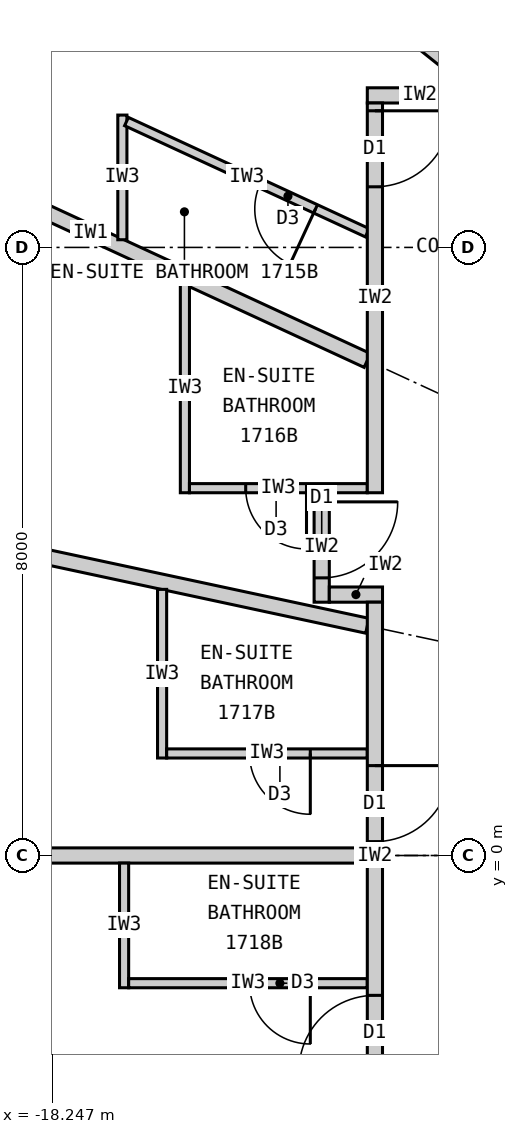
"""IFC4 building model, lengths in metres.
Left out: names, types, materials, properties, quantities, classifications, styles, units other than length and angle.
Written with IfcOpenShell. Run it as: python <this file> out.ifc"""

import sys

from ifc_helpers import new_model, si_unit, direction, frame, frame_2d, origin, place, context, subcontext, project, spatial, rectangle, extrude, element, fill, save


model = new_model("IFC4")
c1 = context("Model", 3, precision=1e-05, world=origin(), true_north=direction((0.0, 1.0)))
c2 = subcontext(c1, "Body", "Model", "MODEL_VIEW")
j1 = project(units=[si_unit("LENGTHUNIT", "METRE"), si_unit("PLANEANGLEUNIT", "RADIAN")], contexts=[c1])
p1 = place(None, origin())
s1 = spatial("IfcSite", under=j1, at=p1, CompositionType="ELEMENT")
p2 = place(p1, origin())
s2 = spatial("IfcBuilding", under=s1, at=p2, CompositionType="ELEMENT")
p3 = place(p2, frame((0.0, 0.0, 70.5)))
s3 = spatial("IfcBuildingStorey", under=s2, at=p3, CompositionType="ELEMENT", Elevation=70.5)
p4 = place(p3, frame((-12.625, 10.1, 0.0), z_axis=(0.0, 0.0, 1.0), x_axis=(-0.780892451574, 0.624665493744, 0.0)))
e1 = element("IfcWall", 1, at=p4, inside=s3, PredefinedType="PARTITIONING", context=c2, shape_type="SweptSolid", body=[
    extrude(rectangle(XDim=6.045, YDim=0.2, at=frame_2d((3.022, 0.0))), origin(), (0.0, 0.0, 1.0), 2.32),
])
p5 = place(p3, frame((-14.1, 6.512, 0.0), z_axis=(0.0, 0.0, 1.0), x_axis=(-0.907832871056, 0.419332181247, 0.0)))
e2 = element("IfcWall", 2, at=p5, inside=s3, PredefinedType="PARTITIONING", context=c2, shape_type="SweptSolid", body=[
    extrude(rectangle(XDim=8.023, YDim=0.2, at=frame_2d((4.011, 0.0))), origin(), (0.0, 0.0, 1.0), 2.32),
])
p6 = place(p3, frame((-14.1, 3.022, 0.0), z_axis=(0.0, 0.0, 1.0), x_axis=(-0.977790014929, 0.209586943072, 0.0)))
e3 = element("IfcWall", 3, at=p6, inside=s3, PredefinedType="PARTITIONING", context=c2, shape_type="SweptSolid", body=[
    extrude(rectangle(XDim=10.087, YDim=0.2, at=frame_2d((5.043, 0.0))), origin(), (0.0, 0.0, 1.0), 2.32),
])
p7 = place(p3, frame((-14.1, 0.0, 0.0), z_axis=(0.0, 0.0, 1.0), x_axis=(-1.0, 0.0, 0.0)))
e4 = element("IfcWall", 4, at=p7, inside=s3, PredefinedType="PARTITIONING", context=c2, shape_type="SweptSolid", body=[
    extrude(rectangle(XDim=10.75, YDim=0.2, at=frame_2d((5.375, 0.0))), origin(), (0.0, 0.0, 1.0), 2.27),
])
p8 = place(p3, frame((-17.323, 8.101, 0.0), z_axis=(0.0, 0.0, 1.0), x_axis=(0.0, 1.0, 0.0)))
e5 = element("IfcWall", 5, at=p8, inside=s3, PredefinedType="PARTITIONING", context=c2, shape_type="SweptSolid", body=[
    extrude(rectangle(XDim=1.64, YDim=0.12, at=frame_2d((0.82, 0.0))), origin(), (0.0, 0.0, 1.0), 3.12),
])
p9 = place(p3, frame((-14.1, 8.193, 0.0), z_axis=(0.0, 0.0, 1.0), x_axis=(-0.907836493557, 0.419324338628, 0.0)))
e6 = element("IfcWall", 6, at=p9, inside=s3, PredefinedType="PARTITIONING", context=c2, shape_type="SweptSolid", body=[
    extrude(rectangle(XDim=3.49, YDim=0.12, at=frame_2d((1.745, 0.0))), origin(), (0.0, 0.0, 1.0), 3.12),
])
p10 = place(p9, frame((0.75, 0.0, 0.0)))
e7 = element("IfcOpeningElement", 7, at=p10, cuts=e6, PredefinedType="OPENING", context=c2, shape_type="SweptSolid", body=[
    extrude(rectangle(XDim=0.8, YDim=2.1, at=frame_2d((0.4, 1.05))), frame((0.0, 0.07, 0.0), z_axis=(0.0, -1.0, 0.0), x_axis=(1.0, 0.0, 0.0)), (0.0, 0.0, 1.0), 0.14),
])
p11 = place(p3, frame((-16.5, 7.521, 0.0), z_axis=(0.0, 0.0, 1.0), x_axis=(0.0, -1.0, 0.0)))
e8 = element("IfcWall", 8, at=p11, inside=s3, PredefinedType="PARTITIONING", context=c2, shape_type="SweptSolid", body=[
    extrude(rectangle(XDim=2.749, YDim=0.12, at=frame_2d((1.374, 0.0))), origin(), (0.0, 0.0, 1.0), 3.12),
])
p12 = place(p3, frame((-14.1, 4.833, 0.0), z_axis=(0.0, 0.0, 1.0), x_axis=(-1.0, 0.0, 0.0)))
e9 = element("IfcWall", 9, at=p12, inside=s3, PredefinedType="PARTITIONING", context=c2, shape_type="SweptSolid", body=[
    extrude(rectangle(XDim=2.34, YDim=0.12, at=frame_2d((1.17, 0.0))), origin(), (0.0, 0.0, 1.0), 3.12),
])
p13 = place(p12, frame((0.8, 0.0, 0.0)))
e10 = element("IfcOpeningElement", 10, at=p13, cuts=e9, PredefinedType="OPENING", context=c2, shape_type="SweptSolid", body=[
    extrude(rectangle(XDim=0.8, YDim=2.1, at=frame_2d((0.4, 1.05))), frame((0.0, 0.07, 0.0), z_axis=(0.0, -1.0, 0.0), x_axis=(1.0, 0.0, 0.0)), (0.0, 0.0, 1.0), 0.14),
])
p14 = place(p3, frame((-16.8, 3.501, 0.0), z_axis=(0.0, 0.0, 1.0), x_axis=(0.0, -1.0, 0.0)))
e11 = element("IfcWall", 11, at=p14, inside=s3, PredefinedType="PARTITIONING", context=c2, shape_type="SweptSolid", body=[
    extrude(rectangle(XDim=2.219, YDim=0.12, at=frame_2d((1.109, 0.0))), origin(), (0.0, 0.0, 1.0), 3.12),
])
p15 = place(p3, frame((-14.1, 1.343, 0.0), z_axis=(0.0, 0.0, 1.0), x_axis=(-1.0, 0.0, 0.0)))
e12 = element("IfcWall", 12, at=p15, inside=s3, PredefinedType="PARTITIONING", context=c2, shape_type="SweptSolid", body=[
    extrude(rectangle(XDim=2.64, YDim=0.12, at=frame_2d((1.32, 0.0))), origin(), (0.0, 0.0, 1.0), 3.12),
])
p16 = place(p15, frame((0.75, 0.0, 0.0)))
e13 = element("IfcOpeningElement", 13, at=p16, cuts=e12, PredefinedType="OPENING", context=c2, shape_type="SweptSolid", body=[
    extrude(rectangle(XDim=0.8, YDim=2.1, at=frame_2d((0.4, 1.05))), frame((0.0, 0.07, 0.0), z_axis=(0.0, -1.0, 0.0), x_axis=(1.0, 0.0, 0.0)), (0.0, 0.0, 1.0), 0.14),
])
p17 = place(p3, frame((-17.3, -0.1, 0.0), z_axis=(0.0, 0.0, 1.0), x_axis=(0.0, -1.0, 0.0)))
e14 = element("IfcWall", 14, at=p17, inside=s3, PredefinedType="PARTITIONING", context=c2, shape_type="SweptSolid", body=[
    extrude(rectangle(XDim=1.64, YDim=0.12, at=frame_2d((0.82, 0.0))), origin(), (0.0, 0.0, 1.0), 3.12),
])
p18 = place(p3, frame((-14.1, -1.68, 0.0), z_axis=(0.0, 0.0, 1.0), x_axis=(-1.0, 0.0, 0.0)))
e15 = element("IfcWall", 15, at=p18, inside=s3, PredefinedType="PARTITIONING", context=c2, shape_type="SweptSolid", body=[
    extrude(rectangle(XDim=3.14, YDim=0.12, at=frame_2d((1.57, 0.0))), origin(), (0.0, 0.0, 1.0), 3.12),
])
p19 = place(p18, frame((0.75, 0.0, 0.0)))
e16 = element("IfcOpeningElement", 16, at=p19, cuts=e15, PredefinedType="OPENING", context=c2, shape_type="SweptSolid", body=[
    extrude(rectangle(XDim=0.8, YDim=2.1, at=frame_2d((0.4, 1.05))), frame((0.0, 0.07, 0.0), z_axis=(0.0, -1.0, 0.0), x_axis=(1.0, 0.0, 0.0)), (0.0, 0.0, 1.0), 0.14),
])
p20 = place(p3, frame((-14.7, 4.772, 0.0), z_axis=(0.0, 0.0, 1.0), x_axis=(0.0, -1.0, 0.0)))
e17 = element("IfcWall", 17, at=p20, inside=s3, PredefinedType="PARTITIONING", context=c2, shape_type="SweptSolid", body=[
    extrude(rectangle(XDim=1.44, YDim=0.2, at=frame_2d((0.72, 0.0))), origin(), (0.0, 0.0, 1.0), 3.12),
])
p21 = place(p20, frame((0.12, 0.0, 0.0)))
e18 = element("IfcOpeningElement", 18, at=p21, cuts=e17, PredefinedType="OPENING", context=c2, shape_type="SweptSolid", body=[
    extrude(rectangle(XDim=1.0, YDim=2.2, at=frame_2d((0.5, 1.1))), frame((0.0, 0.11, 0.0), z_axis=(0.0, -1.0, 0.0), x_axis=(1.0, 0.0, 0.0)), (0.0, 0.0, 1.0), 0.22),
])
p22 = place(p3, frame((-13.9, 3.433, 0.0), z_axis=(0.0, 0.0, 1.0), x_axis=(-1.0, 0.0, 0.0)))
e19 = element("IfcWall", 19, at=p22, inside=s3, PredefinedType="PARTITIONING", context=c2, shape_type="SweptSolid", body=[
    extrude(rectangle(XDim=0.7, YDim=0.2, at=frame_2d((0.35, 0.0))), origin(), (0.0, 0.0, 1.0), 2.32),
])
p23 = place(p3, frame((-14.1, 10.0, 0.0), z_axis=(0.0, 0.0, 1.0), x_axis=(1.0, 0.0, 0.0)))
e20 = element("IfcWall", 20, at=p23, inside=s3, PredefinedType="PARTITIONING", context=c2, shape_type="SweptSolid", body=[
    extrude(rectangle(XDim=2.481, YDim=0.2, at=frame_2d((1.24, 0.0))), origin(), (0.0, 0.0, 1.0), 3.12),
])
p24 = place(p3, frame((-14.0, 9.9, 0.0), z_axis=(0.0, 0.0, 1.0), x_axis=(0.0, -1.0, 0.0)))
e21 = element("IfcWall", 21, at=p24, inside=s3, PredefinedType="PARTITIONING", context=c2, shape_type="SweptSolid", body=[
    extrude(rectangle(XDim=5.127, YDim=0.2, at=frame_2d((2.564, 0.0))), origin(), (0.0, 0.0, 1.0), 3.12),
])
p25 = place(p24, frame((0.103, 0.0, 0.0)))
e22 = element("IfcOpeningElement", 22, at=p25, cuts=e21, PredefinedType="OPENING", context=c2, shape_type="SweptSolid", body=[
    extrude(rectangle(XDim=1.0, YDim=2.2, at=frame_2d((0.5, 1.1))), frame((0.0, 0.11, 0.0), z_axis=(0.0, -1.0, 0.0), x_axis=(1.0, 0.0, 0.0)), (0.0, 0.0, 1.0), 0.22),
])
p26 = place(p3, frame((-14.0, 3.333, 0.0), z_axis=(0.0, 0.0, 1.0), x_axis=(0.0, -1.0, 0.0)))
e23 = element("IfcWall", 23, at=p26, inside=s3, PredefinedType="PARTITIONING", context=c2, shape_type="SweptSolid", body=[
    extrude(rectangle(XDim=6.665, YDim=0.2, at=frame_2d((3.333, 0.0))), origin(), (0.0, 0.0, 1.0), 3.12),
])
p27 = place(p26, frame((2.15, 0.0, 0.0)))
e24 = element("IfcOpeningElement", 24, at=p27, cuts=e23, PredefinedType="OPENING", context=c2, shape_type="SweptSolid", body=[
    extrude(rectangle(XDim=1.0, YDim=2.2, at=frame_2d((0.5, 1.1))), frame((0.0, 0.11, 0.0), z_axis=(0.0, -1.0, 0.0), x_axis=(1.0, 0.0, 0.0)), (0.0, 0.0, 1.0), 0.22),
])
p28 = place(p26, frame((5.173, 0.0, 0.0)))
e25 = element("IfcOpeningElement", 25, at=p28, cuts=e23, PredefinedType="OPENING", context=c2, shape_type="SweptSolid", body=[
    extrude(rectangle(XDim=1.0, YDim=2.2, at=frame_2d((0.5, 1.1))), frame((0.0, 0.11, 0.0), z_axis=(0.0, -1.0, 0.0), x_axis=(1.0, 0.0, 0.0)), (0.0, 0.0, 1.0), 0.22),
])
p29 = place(p10, origin())
e26 = element("IfcDoor", 26, at=p29, inside=s3, OperationType="SINGLE_SWING_LEFT", PredefinedType="DOOR", context=c2, shape_type="SweptSolid", body=[
    extrude(rectangle(XDim=0.8, YDim=2.1, at=frame_2d((0.4, 1.05))), frame((0.0, 0.025, 0.0), z_axis=(0.0, -1.0, 0.0), x_axis=(1.0, 0.0, 0.0)), (0.0, 0.0, 1.0), 0.05),
])
fill(e7, e26)
p30 = place(p25, origin())
e27 = element("IfcDoor", 27, at=p30, inside=s3, OperationType="SINGLE_SWING_LEFT", PredefinedType="DOOR", context=c2, shape_type="SweptSolid", body=[
    extrude(rectangle(XDim=1.0, YDim=2.2, at=frame_2d((0.5, 1.1))), frame((0.0, 0.025, 0.0), z_axis=(0.0, -1.0, 0.0), x_axis=(1.0, 0.0, 0.0)), (0.0, 0.0, 1.0), 0.05),
])
fill(e22, e27)
p31 = place(p13, origin())
e28 = element("IfcDoor", 28, at=p31, inside=s3, OperationType="SINGLE_SWING_LEFT", PredefinedType="DOOR", context=c2, shape_type="SweptSolid", body=[
    extrude(rectangle(XDim=0.8, YDim=2.1, at=frame_2d((0.4, 1.05))), frame((0.0, 0.025, 0.0), z_axis=(0.0, -1.0, 0.0), x_axis=(1.0, 0.0, 0.0)), (0.0, 0.0, 1.0), 0.05),
])
fill(e10, e28)
p32 = place(p21, origin())
e29 = element("IfcDoor", 29, at=p32, inside=s3, OperationType="SINGLE_SWING_LEFT", PredefinedType="DOOR", context=c2, shape_type="SweptSolid", body=[
    extrude(rectangle(XDim=1.0, YDim=2.2, at=frame_2d((0.5, 1.1))), frame((0.0, 0.025, 0.0), z_axis=(0.0, -1.0, 0.0), x_axis=(1.0, 0.0, 0.0)), (0.0, 0.0, 1.0), 0.05),
])
fill(e18, e29)
p33 = place(p16, origin())
e30 = element("IfcDoor", 30, at=p33, inside=s3, OperationType="SINGLE_SWING_LEFT", PredefinedType="DOOR", context=c2, shape_type="SweptSolid", body=[
    extrude(rectangle(XDim=0.8, YDim=2.1, at=frame_2d((0.4, 1.05))), frame((0.0, 0.025, 0.0), z_axis=(0.0, -1.0, 0.0), x_axis=(1.0, 0.0, 0.0)), (0.0, 0.0, 1.0), 0.05),
])
fill(e13, e30)
p34 = place(p27, origin())
e31 = element("IfcDoor", 31, at=p34, inside=s3, OperationType="SINGLE_SWING_LEFT", PredefinedType="DOOR", context=c2, shape_type="SweptSolid", body=[
    extrude(rectangle(XDim=1.0, YDim=2.2, at=frame_2d((0.5, 1.1))), frame((0.0, 0.025, 0.0), z_axis=(0.0, -1.0, 0.0), x_axis=(1.0, 0.0, 0.0)), (0.0, 0.0, 1.0), 0.05),
])
fill(e24, e31)
p35 = place(p19, origin())
e32 = element("IfcDoor", 32, at=p35, inside=s3, OperationType="SINGLE_SWING_LEFT", PredefinedType="DOOR", context=c2, shape_type="SweptSolid", body=[
    extrude(rectangle(XDim=0.8, YDim=2.1, at=frame_2d((0.4, 1.05))), frame((0.0, 0.025, 0.0), z_axis=(0.0, -1.0, 0.0), x_axis=(1.0, 0.0, 0.0)), (0.0, 0.0, 1.0), 0.05),
])
fill(e16, e32)
p36 = place(p28, origin())
e33 = element("IfcDoor", 33, at=p36, inside=s3, OperationType="SINGLE_SWING_RIGHT", PredefinedType="DOOR", context=c2, shape_type="SweptSolid", body=[
    extrude(rectangle(XDim=1.0, YDim=2.2, at=frame_2d((0.5, 1.1))), frame((0.0, 0.025, 0.0), z_axis=(0.0, -1.0, 0.0), x_axis=(1.0, 0.0, 0.0)), (0.0, 0.0, 1.0), 0.05),
])
fill(e25, e33)
save(model, sys.argv[1])
